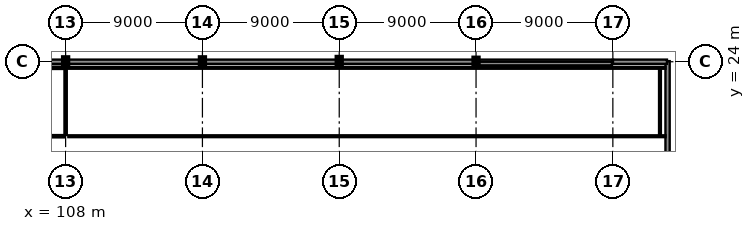
"""IFC4 building model, lengths in metres.
Left out: names, types, materials, properties, quantities, classifications, styles, units other than length and angle.
Written with IfcOpenShell. Run it as: python <this file> out.ifc"""

import sys

from ifc_helpers import new_model, si_unit, direction, frame, frame_2d, origin, origin_2d, place, context, subcontext, project, spatial, rectangle, i_section, extrude, element, fill, save


model = new_model("IFC4")
c1 = context("Model", 3, precision=1e-05, world=origin(), true_north=direction((0.0, 1.0)))
c2 = subcontext(c1, "Body", "Model", "MODEL_VIEW")
j1 = project(units=[si_unit("LENGTHUNIT", "METRE"), si_unit("PLANEANGLEUNIT", "RADIAN")], contexts=[c1])
p1 = place(None, origin())
s1 = spatial("IfcSite", under=j1, at=p1, CompositionType="ELEMENT")
p2 = place(p1, origin())
s2 = spatial("IfcBuilding", under=s1, at=p2, CompositionType="ELEMENT")
p3 = place(p2, frame((0.0, 0.0, 23.4)))
s3 = spatial("IfcBuildingStorey", under=s2, at=p3, CompositionType="ELEMENT", Elevation=23.4)
for number, where, z_axis, x_axis in (
    (1, (108.0, 24.0, 0.0), (0.0, 0.0, 1.0), (1.0, 0.0, 0.0)),
    (2, (117.0, 24.0, 0.0), (0.0, 0.0, 1.0), (1.0, 0.0, 0.0)),
):
    element("IfcColumn", number, at=place(p3, frame(where, z_axis=z_axis, x_axis=x_axis)), inside=s3, PredefinedType="COLUMN", context=c2, shape_type="SweptSolid", body=[
        extrude(i_section(OverallWidth=0.3, OverallDepth=0.55, WebThickness=0.015, FlangeThickness=0.029, at=origin_2d()), origin(), (0.0, 0.0, 1.0), 4.0),
    ])
p4 = place(p3, frame((126.0, 24.0, 0.0), z_axis=(0.0, 0.0, 1.0), x_axis=(1.0, 0.0, 0.0)))
e3 = element("IfcColumn", 3, at=p4, inside=s3, PredefinedType="COLUMN", context=c2, shape_type="SweptSolid", body=[
    extrude(i_section(OverallWidth=0.3, OverallDepth=0.6, WebThickness=0.015, FlangeThickness=0.03, at=origin_2d()), origin(), (0.0, 0.0, 1.0), 4.0),
])
p5 = place(p3, frame((135.0, 24.0, 0.0), z_axis=(0.0, 0.0, 1.0), x_axis=(1.0, 0.0, 0.0)))
e4 = element("IfcColumn", 4, at=p5, inside=s3, PredefinedType="COLUMN", context=c2, shape_type="SweptSolid", body=[
    extrude(i_section(OverallWidth=0.3, OverallDepth=0.5, WebThickness=0.014, FlangeThickness=0.028, at=origin_2d()), origin(), (0.0, 0.0, 1.0), 4.0),
])
p6 = place(p3, frame((147.6, 11.99, 0.0), z_axis=(0.0, 0.0, 1.0), x_axis=(0.0, 1.0, 0.0)))
e5 = element("IfcWall", 5, at=p6, inside=s3, PredefinedType="SOLIDWALL", context=c2, shape_type="SweptSolid", body=[
    extrude(rectangle(XDim=12.05, YDim=0.28, at=frame_2d((6.025, 0.0))), origin(), (0.0, 0.0, 1.0), 3.055),
])
p7 = place(p6, frame((2.17, 0.0, 0.9)))
e6 = element("IfcOpeningElement", 6, at=p7, cuts=e5, PredefinedType="OPENING", context=c2, shape_type="SweptSolid", body=[
    extrude(rectangle(XDim=1.3, YDim=1.3, at=frame_2d((0.65, 0.65))), frame((0.0, 0.155, 0.0), z_axis=(0.0, -1.0, 0.0), x_axis=(1.0, 0.0, 0.0)), (0.0, 0.0, 1.0), 0.31),
])
p8 = place(p6, frame((7.785, 0.0, 0.9)))
e7 = element("IfcOpeningElement", 7, at=p8, cuts=e5, PredefinedType="OPENING", context=c2, shape_type="SweptSolid", body=[
    extrude(rectangle(XDim=1.3, YDim=1.3, at=frame_2d((0.65, 0.65))), frame((0.0, 0.155, 0.0), z_axis=(0.0, -1.0, 0.0), x_axis=(1.0, 0.0, 0.0)), (0.0, 0.0, 1.0), 0.31),
])
p9 = place(p3, frame((147.56, 24.0, 0.0), z_axis=(0.0, 0.0, 1.0), x_axis=(-1.0, 0.0, 0.0)))
e8 = element("IfcWall", 8, at=p9, inside=s3, PredefinedType="SOLIDWALL", context=c2, shape_type="SweptSolid", body=[
    extrude(rectangle(XDim=3.57, YDim=0.28, at=frame_2d((1.785, 0.0))), origin(), (0.0, 0.0, 1.0), 2.747),
])
p10 = place(p3, frame((144.01, 24.0, 0.0), z_axis=(0.0, 0.0, 1.0), x_axis=(-1.0, 0.0, 0.0)))
e9 = element("IfcWall", 9, at=p10, inside=s3, PredefinedType="SOLIDWALL", context=c2, shape_type="SweptSolid", body=[
    extrude(rectangle(XDim=9.002, YDim=0.28, at=frame_2d((4.501, 0.0))), origin(), (0.0, 0.0, 1.0), 2.747),
])
p11 = place(p3, frame((134.992, 24.0, 0.0), z_axis=(0.0, 0.0, 1.0), x_axis=(-1.0, 0.0, 0.0)))
e10 = element("IfcWall", 10, at=p11, inside=s3, PredefinedType="SOLIDWALL", context=c2, shape_type="SweptSolid", body=[
    extrude(rectangle(XDim=8.984, YDim=0.28, at=frame_2d((4.492, 0.0))), origin(), (0.0, 0.0, 1.0), 2.747),
])
p12 = place(p11, frame((2.045, 0.0, 0.9)))
e11 = element("IfcOpeningElement", 11, at=p12, cuts=e10, PredefinedType="OPENING", context=c2, shape_type="SweptSolid", body=[
    extrude(rectangle(XDim=1.3, YDim=1.3, at=frame_2d((0.65, 0.65))), frame((0.0, 0.155, 0.0), z_axis=(0.0, -1.0, 0.0), x_axis=(1.0, 0.0, 0.0)), (0.0, 0.0, 1.0), 0.31),
])
p13 = place(p11, frame((5.639, 0.0, 0.9)))
e12 = element("IfcOpeningElement", 12, at=p13, cuts=e10, PredefinedType="OPENING", context=c2, shape_type="SweptSolid", body=[
    extrude(rectangle(XDim=1.3, YDim=1.3, at=frame_2d((0.65, 0.65))), frame((0.0, 0.155, 0.0), z_axis=(0.0, -1.0, 0.0), x_axis=(1.0, 0.0, 0.0)), (0.0, 0.0, 1.0), 0.31),
])
p14 = place(p3, frame((125.992, 24.0, 0.0), z_axis=(0.0, 0.0, 1.0), x_axis=(-1.0, 0.0, 0.0)))
e13 = element("IfcWall", 13, at=p14, inside=s3, PredefinedType="SOLIDWALL", context=c2, shape_type="SweptSolid", body=[
    extrude(rectangle(XDim=8.984, YDim=0.28, at=frame_2d((4.492, 0.0))), origin(), (0.0, 0.0, 1.0), 2.747),
])
p15 = place(p14, frame((2.045, 0.0, 0.9)))
e14 = element("IfcOpeningElement", 14, at=p15, cuts=e13, PredefinedType="OPENING", context=c2, shape_type="SweptSolid", body=[
    extrude(rectangle(XDim=1.3, YDim=1.3, at=frame_2d((0.65, 0.65))), frame((0.0, 0.155, 0.0), z_axis=(0.0, -1.0, 0.0), x_axis=(1.0, 0.0, 0.0)), (0.0, 0.0, 1.0), 0.31),
])
p16 = place(p14, frame((5.639, 0.0, 0.9)))
e15 = element("IfcOpeningElement", 15, at=p16, cuts=e13, PredefinedType="OPENING", context=c2, shape_type="SweptSolid", body=[
    extrude(rectangle(XDim=1.3, YDim=1.3, at=frame_2d((0.65, 0.65))), frame((0.0, 0.155, 0.0), z_axis=(0.0, -1.0, 0.0), x_axis=(1.0, 0.0, 0.0)), (0.0, 0.0, 1.0), 0.31),
])
p17 = place(p3, frame((116.992, 24.0, 0.0), z_axis=(0.0, 0.0, 1.0), x_axis=(-1.0, 0.0, 0.0)))
e16 = element("IfcWall", 16, at=p17, inside=s3, PredefinedType="SOLIDWALL", context=c2, shape_type="SweptSolid", body=[
    extrude(rectangle(XDim=8.984, YDim=0.28, at=frame_2d((4.492, 0.0))), origin(), (0.0, 0.0, 1.0), 2.747),
])
p18 = place(p17, frame((2.045, 0.0, 0.9)))
e17 = element("IfcOpeningElement", 17, at=p18, cuts=e16, PredefinedType="OPENING", context=c2, shape_type="SweptSolid", body=[
    extrude(rectangle(XDim=1.3, YDim=1.3, at=frame_2d((0.65, 0.65))), frame((0.0, 0.155, 0.0), z_axis=(0.0, -1.0, 0.0), x_axis=(1.0, 0.0, 0.0)), (0.0, 0.0, 1.0), 0.31),
])
p19 = place(p17, frame((5.639, 0.0, 0.9)))
e18 = element("IfcOpeningElement", 18, at=p19, cuts=e16, PredefinedType="OPENING", context=c2, shape_type="SweptSolid", body=[
    extrude(rectangle(XDim=1.3, YDim=1.3, at=frame_2d((0.65, 0.65))), frame((0.0, 0.155, 0.0), z_axis=(0.0, -1.0, 0.0), x_axis=(1.0, 0.0, 0.0)), (0.0, 0.0, 1.0), 0.31),
])
p20 = place(p3, frame((107.992, 24.0, 0.0), z_axis=(0.0, 0.0, 1.0), x_axis=(-1.0, 0.0, 0.0)))
e19 = element("IfcWall", 19, at=p20, inside=s3, PredefinedType="SOLIDWALL", context=c2, shape_type="SweptSolid", body=[
    extrude(rectangle(XDim=8.619, YDim=0.28, at=frame_2d((4.31, 0.0))), origin(), (0.0, 0.0, 1.0), 3.315),
])
p21 = place(p20, frame((1.413, 0.0, 0.85)))
e20 = element("IfcOpeningElement", 20, at=p21, cuts=e19, PredefinedType="OPENING", context=c2, shape_type="SweptSolid", body=[
    extrude(rectangle(XDim=2.0, YDim=2.0, at=frame_2d((1.0, 1.0))), frame((0.0, 0.155, 0.0), z_axis=(0.0, -1.0, 0.0), x_axis=(1.0, 0.0, 0.0)), (0.0, 0.0, 1.0), 0.31),
])
p22 = place(p20, frame((5.206, 0.0, 0.85)))
e21 = element("IfcOpeningElement", 21, at=p22, cuts=e19, PredefinedType="OPENING", context=c2, shape_type="SweptSolid", body=[
    extrude(rectangle(XDim=2.0, YDim=2.0, at=frame_2d((1.0, 1.0))), frame((0.0, 0.155, 0.0), z_axis=(0.0, -1.0, 0.0), x_axis=(1.0, 0.0, 0.0)), (0.0, 0.0, 1.0), 0.31),
])
p23 = place(p3, frame((135.06, 23.88, 3.78), z_axis=(0.0, 0.0, 1.0), x_axis=(1.0, 0.0, 0.0)))
e22 = element("IfcWall", 22, at=p23, inside=s3, PredefinedType="PARAPET", context=c2, shape_type="SweptSolid", body=[
    extrude(rectangle(XDim=8.88, YDim=0.24, at=frame_2d((4.44, 0.0))), origin(), (0.0, 0.0, 1.0), 0.77),
])
p24 = place(p3, frame((108.0, 23.52, 0.0), z_axis=(0.0, 0.0, 1.0), x_axis=(0.0, -1.0, 0.0)))
e23 = element("IfcWall", 23, at=p24, inside=s3, PredefinedType="PARTITIONING", context=c2, shape_type="SweptSolid", body=[
    extrude(rectangle(XDim=4.34, YDim=0.15, at=frame_2d((2.17, 0.0))), origin(), (0.0, 0.0, 1.0), 3.405),
])
p25 = place(p3, frame((107.92, 19.1, 0.0), z_axis=(0.0, 0.0, 1.0), x_axis=(-1.0, 0.0, 0.0)))
e24 = element("IfcWall", 24, at=p25, inside=s3, PredefinedType="PARTITIONING", context=c2, shape_type="SweptSolid", body=[
    extrude(rectangle(XDim=29.74, YDim=0.15, at=frame_2d((14.87, 0.0))), origin(), (0.0, 0.0, 1.0), 3.64),
])
p26 = place(p25, frame((14.345, 0.0, 0.0)))
e25 = element("IfcOpeningElement", 25, at=p26, cuts=e24, PredefinedType="OPENING", context=c2, shape_type="SweptSolid", body=[
    extrude(rectangle(XDim=1.05, YDim=2.25, at=frame_2d((0.525, 1.125))), frame((0.0, 0.09, 0.0), z_axis=(0.0, -1.0, 0.0), x_axis=(1.0, 0.0, 0.0)), (0.0, 0.0, 1.0), 0.18),
])
p27 = place(p3, frame((78.095, 23.6, 0.0), z_axis=(0.0, 0.0, 1.0), x_axis=(1.0, 0.0, 0.0)))
e26 = element("IfcWall", 26, at=p27, inside=s3, PredefinedType="PARTITIONING", context=c2, shape_type="SweptSolid", body=[
    extrude(rectangle(XDim=29.825, YDim=0.15, at=frame_2d((14.913, 0.0))), origin(), (0.0, 0.0, 1.0), 3.64),
])
p28 = place(p3, frame((147.465, 19.1, 0.0), z_axis=(0.0, 0.0, 1.0), x_axis=(-1.0, 0.0, 0.0)))
e27 = element("IfcWall", 27, at=p28, inside=s3, PredefinedType="PARTITIONING", context=c2, shape_type="SweptSolid", body=[
    extrude(rectangle(XDim=39.285, YDim=0.12, at=frame_2d((19.643, 0.0))), origin(), (0.0, 0.0, 1.0), 3.64),
])
p29 = place(p28, frame((19.192, 0.0, 0.0)))
e28 = element("IfcOpeningElement", 28, at=p29, cuts=e27, PredefinedType="OPENING", context=c2, shape_type="SweptSolid", body=[
    extrude(rectangle(XDim=0.9, YDim=2.1, at=frame_2d((0.45, 1.05))), frame((0.0, 0.075, 0.0), z_axis=(0.0, -1.0, 0.0), x_axis=(1.0, 0.0, 0.0)), (0.0, 0.0, 1.0), 0.15),
])
p30 = place(p3, frame((108.18, 23.6, 0.0), z_axis=(0.0, 0.0, 1.0), x_axis=(1.0, 0.0, 0.0)))
e29 = element("IfcWall", 29, at=p30, inside=s3, PredefinedType="PARTITIONING", context=c2, shape_type="SweptSolid", body=[
    extrude(rectangle(XDim=39.285, YDim=0.12, at=frame_2d((19.643, 0.0))), origin(), (0.0, 0.0, 1.0), 3.64),
])
p31 = place(p3, frame((147.1, 23.545, 0.0), z_axis=(0.0, 0.0, 1.0), x_axis=(0.0, -1.0, 0.0)))
e30 = element("IfcWall", 30, at=p31, inside=s3, PredefinedType="PARTITIONING", context=c2, shape_type="SweptSolid", body=[
    extrude(rectangle(XDim=4.39, YDim=0.12, at=frame_2d((2.195, 0.0))), origin(), (0.0, 0.0, 1.0), 3.64),
])
p32 = place(p8, origin())
e31 = element("IfcWindow", 31, at=p32, inside=s3, PartitioningType="SINGLE_PANEL", PredefinedType="WINDOW", context=c2, shape_type="SweptSolid", body=[
    extrude(rectangle(XDim=1.3, YDim=1.3, at=frame_2d((0.65, 0.65))), frame((0.0, 0.03, 0.0), z_axis=(0.0, -1.0, 0.0), x_axis=(1.0, 0.0, 0.0)), (0.0, 0.0, 1.0), 0.06),
])
fill(e7, e31)
p33 = place(p12, origin())
e32 = element("IfcWindow", 32, at=p33, inside=s3, PartitioningType="SINGLE_PANEL", PredefinedType="WINDOW", context=c2, shape_type="SweptSolid", body=[
    extrude(rectangle(XDim=1.3, YDim=1.3, at=frame_2d((0.65, 0.65))), frame((0.0, 0.03, 0.0), z_axis=(0.0, -1.0, 0.0), x_axis=(1.0, 0.0, 0.0)), (0.0, 0.0, 1.0), 0.06),
])
fill(e11, e32)
p34 = place(p13, origin())
e33 = element("IfcWindow", 33, at=p34, inside=s3, PartitioningType="SINGLE_PANEL", PredefinedType="WINDOW", context=c2, shape_type="SweptSolid", body=[
    extrude(rectangle(XDim=1.3, YDim=1.3, at=frame_2d((0.65, 0.65))), frame((0.0, 0.03, 0.0), z_axis=(0.0, -1.0, 0.0), x_axis=(1.0, 0.0, 0.0)), (0.0, 0.0, 1.0), 0.06),
])
fill(e12, e33)
p35 = place(p15, origin())
e34 = element("IfcWindow", 34, at=p35, inside=s3, PartitioningType="SINGLE_PANEL", PredefinedType="WINDOW", context=c2, shape_type="SweptSolid", body=[
    extrude(rectangle(XDim=1.3, YDim=1.3, at=frame_2d((0.65, 0.65))), frame((0.0, 0.03, 0.0), z_axis=(0.0, -1.0, 0.0), x_axis=(1.0, 0.0, 0.0)), (0.0, 0.0, 1.0), 0.06),
])
fill(e14, e34)
p36 = place(p16, origin())
e35 = element("IfcWindow", 35, at=p36, inside=s3, PartitioningType="SINGLE_PANEL", PredefinedType="WINDOW", context=c2, shape_type="SweptSolid", body=[
    extrude(rectangle(XDim=1.3, YDim=1.3, at=frame_2d((0.65, 0.65))), frame((0.0, 0.03, 0.0), z_axis=(0.0, -1.0, 0.0), x_axis=(1.0, 0.0, 0.0)), (0.0, 0.0, 1.0), 0.06),
])
fill(e15, e35)
p37 = place(p18, origin())
e36 = element("IfcWindow", 36, at=p37, inside=s3, PartitioningType="SINGLE_PANEL", PredefinedType="WINDOW", context=c2, shape_type="SweptSolid", body=[
    extrude(rectangle(XDim=1.3, YDim=1.3, at=frame_2d((0.65, 0.65))), frame((0.0, 0.03, 0.0), z_axis=(0.0, -1.0, 0.0), x_axis=(1.0, 0.0, 0.0)), (0.0, 0.0, 1.0), 0.06),
])
fill(e17, e36)
p38 = place(p19, origin())
e37 = element("IfcWindow", 37, at=p38, inside=s3, PartitioningType="SINGLE_PANEL", PredefinedType="WINDOW", context=c2, shape_type="SweptSolid", body=[
    extrude(rectangle(XDim=1.3, YDim=1.3, at=frame_2d((0.65, 0.65))), frame((0.0, 0.03, 0.0), z_axis=(0.0, -1.0, 0.0), x_axis=(1.0, 0.0, 0.0)), (0.0, 0.0, 1.0), 0.06),
])
fill(e18, e37)
p39 = place(p29, origin())
e38 = element("IfcDoor", 38, at=p39, inside=s3, OperationType="SINGLE_SWING_RIGHT", PredefinedType="DOOR", context=c2, shape_type="SweptSolid", body=[
    extrude(rectangle(XDim=0.9, YDim=2.1, at=frame_2d((0.45, 1.05))), frame((0.0, 0.025, 0.0), z_axis=(0.0, -1.0, 0.0), x_axis=(1.0, 0.0, 0.0)), (0.0, 0.0, 1.0), 0.05),
])
fill(e28, e38)
save(model, sys.argv[1])
